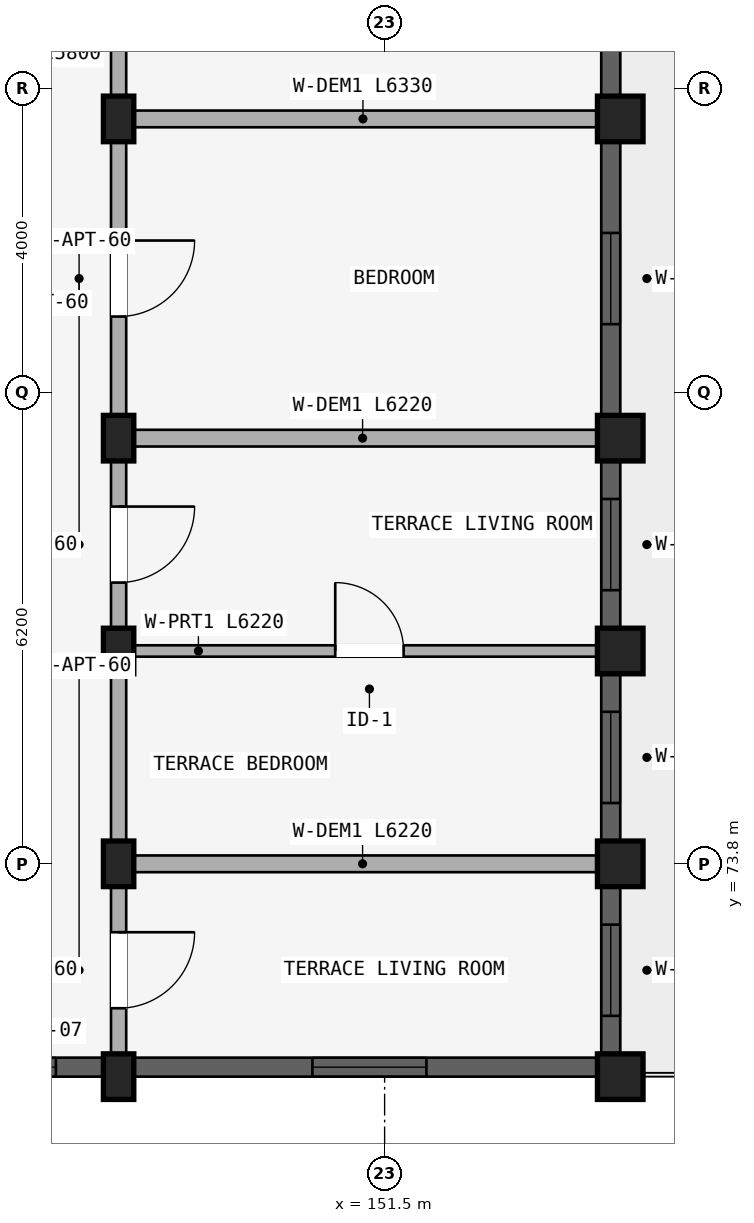
"""IFC4 building model, lengths in metres.
Left out: names, types, materials, properties, quantities, classifications, styles, units other than length and angle.
Written with IfcOpenShell. Run it as: python <this file> out.ifc"""

import sys

from ifc_helpers import new_model, si_unit, direction, frame, frame_2d, origin, origin_2d, place, context, subcontext, project, spatial, rectangle, extrude, element, fill, save


model = new_model("IFC4")
c1 = context("Model", 3, precision=1e-05, world=origin(), true_north=direction((0.0, 1.0)))
c2 = subcontext(c1, "Body", "Model", "MODEL_VIEW")
j1 = project(units=[si_unit("LENGTHUNIT", "METRE"), si_unit("PLANEANGLEUNIT", "RADIAN")], contexts=[c1])
p1 = place(None, origin())
s1 = spatial("IfcSite", under=j1, at=p1, CompositionType="ELEMENT")
p2 = place(p1, origin())
s2 = spatial("IfcBuilding", under=s1, at=p2, CompositionType="ELEMENT")
p3 = place(p2, frame((0.0, 0.0, 40.2)))
s3 = spatial("IfcBuildingStorey", under=s2, at=p3, CompositionType="ELEMENT", Elevation=40.2)
p4 = place(p3, frame((148.0, 83.6, 0.0), z_axis=(0.0, 0.0, 1.0), x_axis=(1.0, 0.0, 0.0)))
e1 = element("IfcColumn", 1, at=p4, inside=s3, PredefinedType="COLUMN", context=c2, shape_type="SweptSolid", body=[
    extrude(rectangle(XDim=0.4, YDim=0.6, at=origin_2d()), origin(), (0.0, 0.0, 1.0), 2.91),
])
p5 = place(p3, frame((154.6, 83.6, 0.0), z_axis=(0.0, 0.0, 1.0), x_axis=(1.0, 0.0, 0.0)))
e2 = element("IfcColumn", 2, at=p5, inside=s3, PredefinedType="COLUMN", context=c2, shape_type="SweptSolid", body=[
    extrude(rectangle(XDim=0.6, YDim=0.6, at=origin_2d()), origin(), (0.0, 0.0, 1.0), 2.91),
])
p6 = place(p3, frame((148.0, 79.4, 0.0), z_axis=(0.0, 0.0, 1.0), x_axis=(1.0, 0.0, 0.0)))
e3 = element("IfcColumn", 3, at=p6, inside=s3, PredefinedType="COLUMN", context=c2, shape_type="SweptSolid", body=[
    extrude(rectangle(XDim=0.4, YDim=0.6, at=origin_2d()), origin(), (0.0, 0.0, 1.0), 2.91),
])
p7 = place(p3, frame((154.6, 79.4, 0.0), z_axis=(0.0, 0.0, 1.0), x_axis=(1.0, 0.0, 0.0)))
e4 = element("IfcColumn", 4, at=p7, inside=s3, PredefinedType="COLUMN", context=c2, shape_type="SweptSolid", body=[
    extrude(rectangle(XDim=0.6, YDim=0.6, at=origin_2d()), origin(), (0.0, 0.0, 1.0), 2.91),
])
p8 = place(p3, frame((148.0, 76.6, 0.0), z_axis=(0.0, 0.0, 1.0), x_axis=(1.0, 0.0, 0.0)))
e5 = element("IfcColumn", 5, at=p8, inside=s3, PredefinedType="COLUMN", context=c2, shape_type="SweptSolid", body=[
    extrude(rectangle(XDim=0.4, YDim=0.6, at=origin_2d()), origin(), (0.0, 0.0, 1.0), 2.91),
])
p9 = place(p3, frame((154.6, 76.6, 0.0), z_axis=(0.0, 0.0, 1.0), x_axis=(1.0, 0.0, 0.0)))
e6 = element("IfcColumn", 6, at=p9, inside=s3, PredefinedType="COLUMN", context=c2, shape_type="SweptSolid", body=[
    extrude(rectangle(XDim=0.6, YDim=0.6, at=origin_2d()), origin(), (0.0, 0.0, 1.0), 2.91),
])
p10 = place(p3, frame((148.0, 73.8, 0.0), z_axis=(0.0, 0.0, 1.0), x_axis=(1.0, 0.0, 0.0)))
e7 = element("IfcColumn", 7, at=p10, inside=s3, PredefinedType="COLUMN", context=c2, shape_type="SweptSolid", body=[
    extrude(rectangle(XDim=0.4, YDim=0.6, at=origin_2d()), origin(), (0.0, 0.0, 1.0), 2.91),
])
p11 = place(p3, frame((154.6, 73.8, 0.0), z_axis=(0.0, 0.0, 1.0), x_axis=(1.0, 0.0, 0.0)))
e8 = element("IfcColumn", 8, at=p11, inside=s3, PredefinedType="COLUMN", context=c2, shape_type="SweptSolid", body=[
    extrude(rectangle(XDim=0.6, YDim=0.6, at=origin_2d()), origin(), (0.0, 0.0, 1.0), 2.91),
])
p12 = place(p3, frame((148.0, 71.0, 0.0), z_axis=(0.0, 0.0, 1.0), x_axis=(1.0, 0.0, 0.0)))
e9 = element("IfcColumn", 9, at=p12, inside=s3, PredefinedType="COLUMN", context=c2, shape_type="SweptSolid", body=[
    extrude(rectangle(XDim=0.4, YDim=0.6, at=origin_2d()), origin(), (0.0, 0.0, 1.0), 2.91),
])
p13 = place(p3, frame((154.6, 71.0, 0.0), z_axis=(0.0, 0.0, 1.0), x_axis=(1.0, 0.0, 0.0)))
e10 = element("IfcColumn", 10, at=p13, inside=s3, PredefinedType="COLUMN", context=c2, shape_type="SweptSolid", body=[
    extrude(rectangle(XDim=0.6, YDim=0.6, at=origin_2d()), origin(), (0.0, 0.0, 1.0), 2.91),
])
p14 = place(p3, frame((148.0, 87.65, 0.0), z_axis=(0.0, 0.0, 1.0), x_axis=(0.0, -1.0, 0.0)))
e11 = element("IfcWall", 11, at=p14, inside=s3, PredefinedType="STANDARD", context=c2, shape_type="SweptSolid", body=[
    extrude(rectangle(XDim=4.05, YDim=0.2, at=frame_2d((2.025, 0.0))), origin(), (0.0, 0.0, 1.0), 2.352),
])
p15 = place(p14, frame((1.525, 0.0, 0.0)))
e12 = element("IfcOpeningElement", 12, at=p15, cuts=e11, PredefinedType="OPENING", context=c2, shape_type="SweptSolid", body=[
    extrude(rectangle(XDim=1.0, YDim=2.15, at=frame_2d((0.5, 1.075))), frame((0.0, 0.11, 0.0), z_axis=(0.0, -1.0, 0.0), x_axis=(1.0, 0.0, 0.0)), (0.0, 0.0, 1.0), 0.22),
])
p16 = place(p3, frame((148.0, 83.6, 0.0), z_axis=(0.0, 0.0, 1.0), x_axis=(0.0, -1.0, 0.0)))
e13 = element("IfcWall", 13, at=p16, inside=s3, PredefinedType="STANDARD", context=c2, shape_type="SweptSolid", body=[
    extrude(rectangle(XDim=4.2, YDim=0.2, at=frame_2d((2.1, 0.0))), origin(), (0.0, 0.0, 1.0), 2.352),
])
p17 = place(p16, frame((1.6, 0.0, 0.0)))
e14 = element("IfcOpeningElement", 14, at=p17, cuts=e13, PredefinedType="OPENING", context=c2, shape_type="SweptSolid", body=[
    extrude(rectangle(XDim=1.0, YDim=2.15, at=frame_2d((0.5, 1.075))), frame((0.0, 0.11, 0.0), z_axis=(0.0, -1.0, 0.0), x_axis=(1.0, 0.0, 0.0)), (0.0, 0.0, 1.0), 0.22),
])
p18 = place(p3, frame((148.05, 83.6, 0.0), z_axis=(0.0, 0.0, 1.0), x_axis=(1.0, 0.0, 0.0)))
e15 = element("IfcWall", 15, at=p18, inside=s3, PredefinedType="STANDARD", context=c2, shape_type="SweptSolid", body=[
    extrude(rectangle(XDim=6.33, YDim=0.22, at=frame_2d((3.165, 0.0))), origin(), (0.0, 0.0, 1.0), 2.352),
])
p19 = place(p3, frame((148.0, 79.4, 0.0), z_axis=(0.0, 0.0, 1.0), x_axis=(0.0, -1.0, 0.0)))
e16 = element("IfcWall", 16, at=p19, inside=s3, PredefinedType="STANDARD", context=c2, shape_type="SweptSolid", body=[
    extrude(rectangle(XDim=2.8, YDim=0.2, at=frame_2d((1.4, 0.0))), origin(), (0.0, 0.0, 1.0), 2.352),
])
p20 = place(p19, frame((0.9, 0.0, 0.0)))
e17 = element("IfcOpeningElement", 17, at=p20, cuts=e16, PredefinedType="OPENING", context=c2, shape_type="SweptSolid", body=[
    extrude(rectangle(XDim=1.0, YDim=2.15, at=frame_2d((0.5, 1.075))), frame((0.0, 0.11, 0.0), z_axis=(0.0, -1.0, 0.0), x_axis=(1.0, 0.0, 0.0)), (0.0, 0.0, 1.0), 0.22),
])
p21 = place(p3, frame((148.1, 79.4, 0.0), z_axis=(0.0, 0.0, 1.0), x_axis=(1.0, 0.0, 0.0)))
e18 = element("IfcWall", 18, at=p21, inside=s3, PredefinedType="STANDARD", context=c2, shape_type="SweptSolid", body=[
    extrude(rectangle(XDim=6.22, YDim=0.22, at=frame_2d((3.11, 0.0))), origin(), (0.0, 0.0, 1.0), 2.352),
])
p22 = place(p3, frame((148.0, 76.6, 0.0), z_axis=(0.0, 0.0, 1.0), x_axis=(0.0, -1.0, 0.0)))
e19 = element("IfcWall", 19, at=p22, inside=s3, PredefinedType="STANDARD", context=c2, shape_type="SweptSolid", body=[
    extrude(rectangle(XDim=2.8, YDim=0.2, at=frame_2d((1.4, 0.0))), origin(), (0.0, 0.0, 1.0), 2.352),
])
p23 = place(p3, frame((148.1, 76.6, 0.0), z_axis=(0.0, 0.0, 1.0), x_axis=(1.0, 0.0, 0.0)))
e20 = element("IfcWall", 20, at=p23, inside=s3, PredefinedType="PARTITIONING", context=c2, shape_type="SweptSolid", body=[
    extrude(rectangle(XDim=6.22, YDim=0.15, at=frame_2d((3.11, 0.0))), origin(), (0.0, 0.0, 1.0), 2.352),
])
p24 = place(p23, frame((2.75, 0.0, 0.0)))
e21 = element("IfcOpeningElement", 21, at=p24, cuts=e20, PredefinedType="OPENING", context=c2, shape_type="SweptSolid", body=[
    extrude(rectangle(XDim=0.9, YDim=2.1, at=frame_2d((0.45, 1.05))), frame((0.0, 0.085, 0.0), z_axis=(0.0, -1.0, 0.0), x_axis=(1.0, 0.0, 0.0)), (0.0, 0.0, 1.0), 0.17),
])
p25 = place(p3, frame((148.0, 73.8, 0.0), z_axis=(0.0, 0.0, 1.0), x_axis=(0.0, -1.0, 0.0)))
e22 = element("IfcWall", 22, at=p25, inside=s3, PredefinedType="STANDARD", context=c2, shape_type="SweptSolid", body=[
    extrude(rectangle(XDim=2.8, YDim=0.2, at=frame_2d((1.4, 0.0))), origin(), (0.0, 0.0, 1.0), 2.352),
])
p26 = place(p25, frame((0.9, 0.0, 0.0)))
e23 = element("IfcOpeningElement", 23, at=p26, cuts=e22, PredefinedType="OPENING", context=c2, shape_type="SweptSolid", body=[
    extrude(rectangle(XDim=1.0, YDim=2.15, at=frame_2d((0.5, 1.075))), frame((0.0, 0.11, 0.0), z_axis=(0.0, -1.0, 0.0), x_axis=(1.0, 0.0, 0.0)), (0.0, 0.0, 1.0), 0.22),
])
p27 = place(p3, frame((148.1, 73.8, 0.0), z_axis=(0.0, 0.0, 1.0), x_axis=(1.0, 0.0, 0.0)))
e24 = element("IfcWall", 24, at=p27, inside=s3, PredefinedType="STANDARD", context=c2, shape_type="SweptSolid", body=[
    extrude(rectangle(XDim=6.22, YDim=0.22, at=frame_2d((3.11, 0.0))), origin(), (0.0, 0.0, 1.0), 2.352),
])
p28 = place(p3, frame((154.475, 87.497, 0.0), z_axis=(0.0, 0.0, 1.0), x_axis=(0.0, -1.0, 0.0)))
e25 = element("IfcWall", 25, at=p28, inside=s3, PredefinedType="STANDARD", context=c2, shape_type="SweptSolid", body=[
    extrude(rectangle(XDim=3.593, YDim=0.25, at=frame_2d((1.796, 0.0))), origin(), (0.0, 0.0, 1.0), 2.452),
])
p29 = place(p28, frame((1.197, 0.0, 0.752)))
e26 = element("IfcOpeningElement", 26, at=p29, cuts=e25, PredefinedType="OPENING", context=c2, shape_type="SweptSolid", body=[
    extrude(rectangle(XDim=1.2, YDim=1.5, at=frame_2d((0.6, 0.75))), frame((0.0, 0.135, 0.0), z_axis=(0.0, -1.0, 0.0), x_axis=(1.0, 0.0, 0.0)), (0.0, 0.0, 1.0), 0.27),
])
p30 = place(p3, frame((154.475, 83.296, 0.0), z_axis=(0.0, 0.0, 1.0), x_axis=(0.0, -1.0, 0.0)))
e27 = element("IfcWall", 27, at=p30, inside=s3, PredefinedType="STANDARD", context=c2, shape_type="SweptSolid", body=[
    extrude(rectangle(XDim=3.593, YDim=0.25, at=frame_2d((1.796, 0.0))), origin(), (0.0, 0.0, 1.0), 2.452),
])
p31 = place(p30, frame((1.197, 0.0, 0.752)))
e28 = element("IfcOpeningElement", 28, at=p31, cuts=e27, PredefinedType="OPENING", context=c2, shape_type="SweptSolid", body=[
    extrude(rectangle(XDim=1.2, YDim=1.5, at=frame_2d((0.6, 0.75))), frame((0.0, 0.135, 0.0), z_axis=(0.0, -1.0, 0.0), x_axis=(1.0, 0.0, 0.0)), (0.0, 0.0, 1.0), 0.27),
])
p32 = place(p3, frame((154.475, 79.096, 0.0), z_axis=(0.0, 0.0, 1.0), x_axis=(0.0, -1.0, 0.0)))
e29 = element("IfcWall", 29, at=p32, inside=s3, PredefinedType="STANDARD", context=c2, shape_type="SweptSolid", body=[
    extrude(rectangle(XDim=2.193, YDim=0.25, at=frame_2d((1.096, 0.0))), origin(), (0.0, 0.0, 1.0), 2.452),
])
p33 = place(p32, frame((0.497, 0.0, 0.752)))
e30 = element("IfcOpeningElement", 30, at=p33, cuts=e29, PredefinedType="OPENING", context=c2, shape_type="SweptSolid", body=[
    extrude(rectangle(XDim=1.2, YDim=1.5, at=frame_2d((0.6, 0.75))), frame((0.0, 0.135, 0.0), z_axis=(0.0, -1.0, 0.0), x_axis=(1.0, 0.0, 0.0)), (0.0, 0.0, 1.0), 0.27),
])
p34 = place(p3, frame((154.475, 76.296, 0.0), z_axis=(0.0, 0.0, 1.0), x_axis=(0.0, -1.0, 0.0)))
e31 = element("IfcWall", 31, at=p34, inside=s3, PredefinedType="STANDARD", context=c2, shape_type="SweptSolid", body=[
    extrude(rectangle(XDim=2.193, YDim=0.25, at=frame_2d((1.096, 0.0))), origin(), (0.0, 0.0, 1.0), 2.452),
])
p35 = place(p34, frame((0.497, 0.0, 0.752)))
e32 = element("IfcOpeningElement", 32, at=p35, cuts=e31, PredefinedType="OPENING", context=c2, shape_type="SweptSolid", body=[
    extrude(rectangle(XDim=1.2, YDim=1.5, at=frame_2d((0.6, 0.75))), frame((0.0, 0.135, 0.0), z_axis=(0.0, -1.0, 0.0), x_axis=(1.0, 0.0, 0.0)), (0.0, 0.0, 1.0), 0.27),
])
p36 = place(p3, frame((154.475, 73.497, 0.0), z_axis=(0.0, 0.0, 1.0), x_axis=(0.0, -1.0, 0.0)))
e33 = element("IfcWall", 33, at=p36, inside=s3, PredefinedType="STANDARD", context=c2, shape_type="SweptSolid", body=[
    extrude(rectangle(XDim=2.193, YDim=0.25, at=frame_2d((1.097, 0.0))), origin(), (0.0, 0.0, 1.0), 2.452),
])
p37 = place(p36, frame((0.497, 0.0, 0.752)))
e34 = element("IfcOpeningElement", 34, at=p37, cuts=e33, PredefinedType="OPENING", context=c2, shape_type="SweptSolid", body=[
    extrude(rectangle(XDim=1.2, YDim=1.5, at=frame_2d((0.6, 0.75))), frame((0.0, 0.135, 0.0), z_axis=(0.0, -1.0, 0.0), x_axis=(1.0, 0.0, 0.0)), (0.0, 0.0, 1.0), 0.27),
])
p38 = place(p3, frame((145.803, 71.125, 0.0), z_axis=(0.0, 0.0, 1.0), x_axis=(1.0, 0.0, 0.0)))
e35 = element("IfcWall", 35, at=p38, inside=s3, PredefinedType="STANDARD", context=c2, shape_type="SweptSolid", body=[
    extrude(rectangle(XDim=1.993, YDim=0.25, at=frame_2d((0.997, 0.0))), origin(), (0.0, 0.0, 1.0), 2.352),
])
p39 = place(p38, frame((0.622, 0.0, 0.88)))
e36 = element("IfcOpeningElement", 36, at=p39, cuts=e35, PredefinedType="OPENING", context=c2, shape_type="SweptSolid", body=[
    extrude(rectangle(XDim=0.75, YDim=1.05, at=frame_2d((0.375, 0.525))), frame((0.0, 0.135, 0.0), z_axis=(0.0, -1.0, 0.0), x_axis=(1.0, 0.0, 0.0)), (0.0, 0.0, 1.0), 0.27),
])
p40 = place(p3, frame((148.204, 71.125, 0.0), z_axis=(0.0, 0.0, 1.0), x_axis=(1.0, 0.0, 0.0)))
e37 = element("IfcWall", 37, at=p40, inside=s3, PredefinedType="STANDARD", context=c2, shape_type="SweptSolid", body=[
    extrude(rectangle(XDim=6.093, YDim=0.25, at=frame_2d((3.046, 0.0))), origin(), (0.0, 0.0, 1.0), 2.46),
])
p41 = place(p40, frame((2.346, 0.0, 0.61)))
e38 = element("IfcOpeningElement", 38, at=p41, cuts=e37, PredefinedType="OPENING", context=c2, shape_type="SweptSolid", body=[
    extrude(rectangle(XDim=1.5, YDim=1.65, at=frame_2d((0.75, 0.825))), frame((0.0, 0.135, 0.0), z_axis=(0.0, -1.0, 0.0), x_axis=(1.0, 0.0, 0.0)), (0.0, 0.0, 1.0), 0.27),
])
p42 = place(p31, origin())
e39 = element("IfcWindow", 39, at=p42, inside=s3, PartitioningType="SINGLE_PANEL", PredefinedType="WINDOW", context=c2, shape_type="SweptSolid", body=[
    extrude(rectangle(XDim=1.2, YDim=1.5, at=frame_2d((0.6, 0.75))), frame((0.0, 0.03, 0.0), z_axis=(0.0, -1.0, 0.0), x_axis=(1.0, 0.0, 0.0)), (0.0, 0.0, 1.0), 0.06),
])
fill(e28, e39)
p43 = place(p33, origin())
e40 = element("IfcWindow", 40, at=p43, inside=s3, PartitioningType="SINGLE_PANEL", PredefinedType="WINDOW", context=c2, shape_type="SweptSolid", body=[
    extrude(rectangle(XDim=1.2, YDim=1.5, at=frame_2d((0.6, 0.75))), frame((0.0, 0.03, 0.0), z_axis=(0.0, -1.0, 0.0), x_axis=(1.0, 0.0, 0.0)), (0.0, 0.0, 1.0), 0.06),
])
fill(e30, e40)
p44 = place(p35, origin())
e41 = element("IfcWindow", 41, at=p44, inside=s3, PartitioningType="SINGLE_PANEL", PredefinedType="WINDOW", context=c2, shape_type="SweptSolid", body=[
    extrude(rectangle(XDim=1.2, YDim=1.5, at=frame_2d((0.6, 0.75))), frame((0.0, 0.03, 0.0), z_axis=(0.0, -1.0, 0.0), x_axis=(1.0, 0.0, 0.0)), (0.0, 0.0, 1.0), 0.06),
])
fill(e32, e41)
p45 = place(p37, origin())
e42 = element("IfcWindow", 42, at=p45, inside=s3, PartitioningType="SINGLE_PANEL", PredefinedType="WINDOW", context=c2, shape_type="SweptSolid", body=[
    extrude(rectangle(XDim=1.2, YDim=1.5, at=frame_2d((0.6, 0.75))), frame((0.0, 0.03, 0.0), z_axis=(0.0, -1.0, 0.0), x_axis=(1.0, 0.0, 0.0)), (0.0, 0.0, 1.0), 0.06),
])
fill(e34, e42)
p46 = place(p39, origin())
e43 = element("IfcWindow", 43, at=p46, inside=s3, PartitioningType="SINGLE_PANEL", PredefinedType="WINDOW", context=c2, shape_type="SweptSolid", body=[
    extrude(rectangle(XDim=0.75, YDim=1.05, at=frame_2d((0.375, 0.525))), frame((0.0, 0.03, 0.0), z_axis=(0.0, -1.0, 0.0), x_axis=(1.0, 0.0, 0.0)), (0.0, 0.0, 1.0), 0.06),
])
fill(e36, e43)
p47 = place(p41, origin())
e44 = element("IfcWindow", 44, at=p47, inside=s3, PartitioningType="DOUBLE_PANEL_VERTICAL", PredefinedType="WINDOW", context=c2, shape_type="SweptSolid", body=[
    extrude(rectangle(XDim=1.5, YDim=1.65, at=frame_2d((0.75, 0.825))), frame((0.0, 0.03, 0.0), z_axis=(0.0, -1.0, 0.0), x_axis=(1.0, 0.0, 0.0)), (0.0, 0.0, 1.0), 0.06),
])
fill(e38, e44)
p48 = place(p17, origin())
e45 = element("IfcDoor", 45, at=p48, inside=s3, OperationType="SINGLE_SWING_LEFT", PredefinedType="DOOR", context=c2, shape_type="SweptSolid", body=[
    extrude(rectangle(XDim=1.0, YDim=2.15, at=frame_2d((0.5, 1.075))), frame((0.0, 0.025, 0.0), z_axis=(0.0, -1.0, 0.0), x_axis=(1.0, 0.0, 0.0)), (0.0, 0.0, 1.0), 0.05),
])
fill(e14, e45)
p49 = place(p20, origin())
e46 = element("IfcDoor", 46, at=p49, inside=s3, OperationType="SINGLE_SWING_LEFT", PredefinedType="DOOR", context=c2, shape_type="SweptSolid", body=[
    extrude(rectangle(XDim=1.0, YDim=2.15, at=frame_2d((0.5, 1.075))), frame((0.0, 0.025, 0.0), z_axis=(0.0, -1.0, 0.0), x_axis=(1.0, 0.0, 0.0)), (0.0, 0.0, 1.0), 0.05),
])
fill(e17, e46)
p50 = place(p24, origin())
e47 = element("IfcDoor", 47, at=p50, inside=s3, OperationType="SINGLE_SWING_LEFT", PredefinedType="DOOR", context=c2, shape_type="SweptSolid", body=[
    extrude(rectangle(XDim=0.9, YDim=2.1, at=frame_2d((0.45, 1.05))), frame((0.0, 0.025, 0.0), z_axis=(0.0, -1.0, 0.0), x_axis=(1.0, 0.0, 0.0)), (0.0, 0.0, 1.0), 0.05),
])
fill(e21, e47)
p51 = place(p26, origin())
e48 = element("IfcDoor", 48, at=p51, inside=s3, OperationType="SINGLE_SWING_LEFT", PredefinedType="DOOR", context=c2, shape_type="SweptSolid", body=[
    extrude(rectangle(XDim=1.0, YDim=2.15, at=frame_2d((0.5, 1.075))), frame((0.0, 0.025, 0.0), z_axis=(0.0, -1.0, 0.0), x_axis=(1.0, 0.0, 0.0)), (0.0, 0.0, 1.0), 0.05),
])
fill(e23, e48)
save(model, sys.argv[1])
